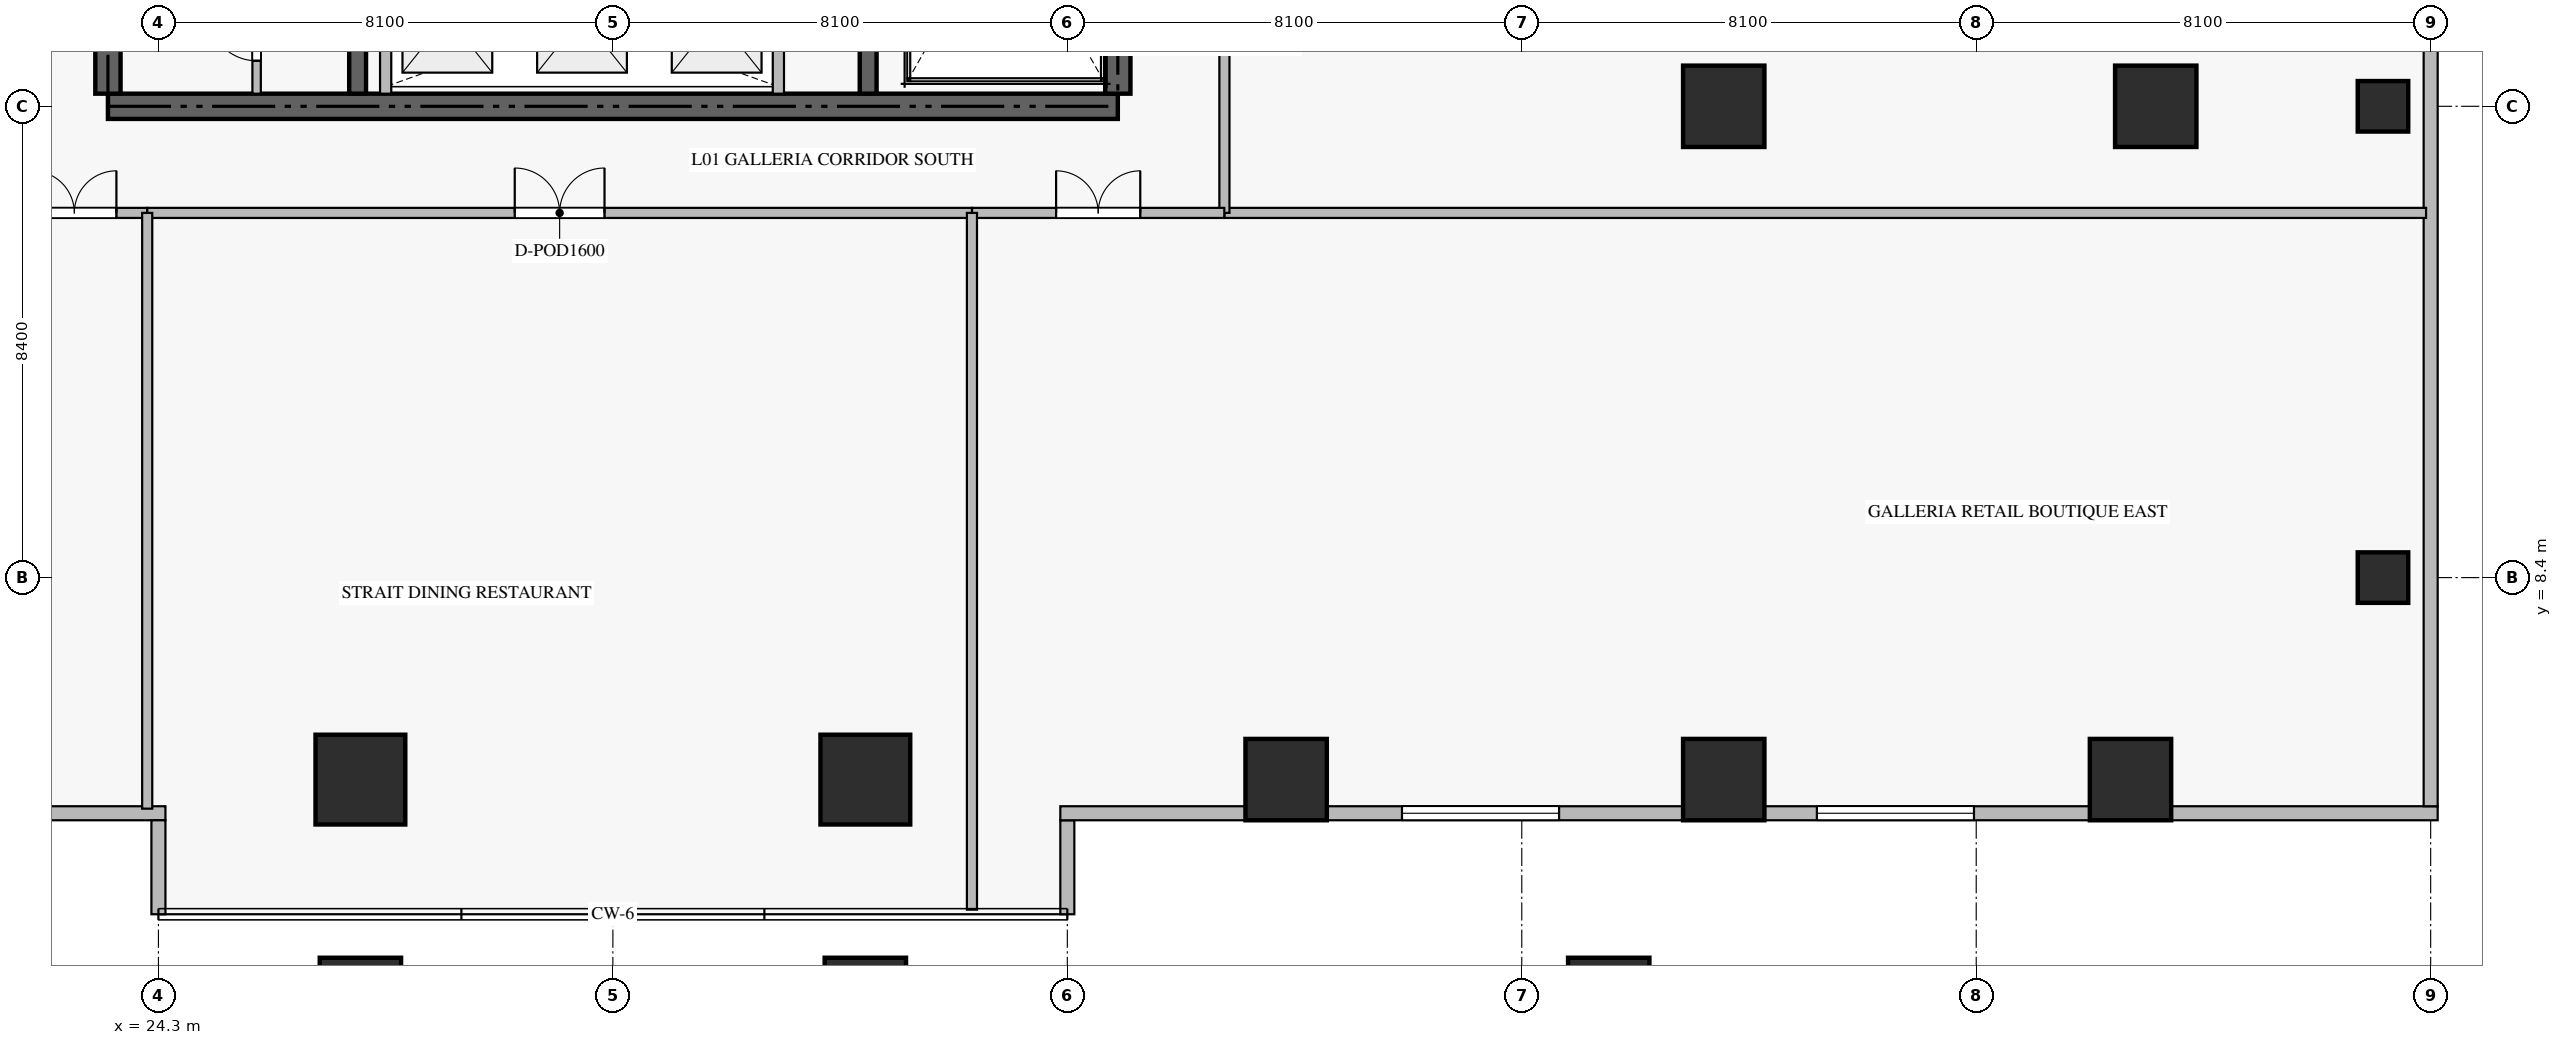
"""IFC4 building model, lengths in metres.
Left out: names, types, materials, properties, quantities, classifications, styles, units other than length and angle.
Written with IfcOpenShell. Run it as: python <this file> out.ifc"""

import sys

from ifc_helpers import new_model, si_unit, direction, frame, frame_2d, origin, origin_2d, place, context, subcontext, project, spatial, rectangle, extrude, source, transform, mapped, element, fill, save


model = new_model("IFC4")
c1 = context("Model", 3, precision=1e-05, world=origin(), true_north=direction((0.0, 1.0)))
c2 = subcontext(c1, "Body", "Model", "MODEL_VIEW")
j1 = project(units=[si_unit("LENGTHUNIT", "METRE"), si_unit("PLANEANGLEUNIT", "RADIAN")], contexts=[c1])
p1 = place(None, origin())
s1 = spatial("IfcSite", under=j1, at=p1, CompositionType="ELEMENT")
p2 = place(p1, origin())
s2 = spatial("IfcBuilding", under=s1, at=p2, CompositionType="ELEMENT")
p3 = place(p2, frame((0.0, 0.0, 5.5)))
s3 = spatial("IfcBuildingStorey", under=s2, at=p3, CompositionType="ELEMENT", Elevation=5.5)
p4 = place(p3, frame((23.4, 16.8, -0.38), z_axis=(0.0, 0.0, 1.0), x_axis=(1.0, 0.0, 0.0)))
e1 = element("IfcWall", 1, at=p4, inside=s3, PredefinedType="SHEAR", context=c2, shape_type="SweptSolid", body=[
    extrude(rectangle(XDim=18.0, YDim=0.45, at=frame_2d((9.0, 0.0))), origin(), (0.0, 0.0, 1.0), 4.998),
])
p5 = place(p3, frame((23.4, 17.025, -0.38), z_axis=(0.0, 0.0, 1.0), x_axis=(0.0, 1.0, 0.0)))
e2 = element("IfcWall", 2, at=p5, inside=s3, PredefinedType="SHEAR", context=c2, shape_type="SweptSolid", body=[
    extrude(rectangle(XDim=4.825, YDim=0.45, at=frame_2d((2.413, 0.0))), origin(), (0.0, 0.0, 1.0), 4.998),
])
p6 = place(p3, frame((41.4, 17.025, -0.38), z_axis=(0.0, 0.0, 1.0), x_axis=(0.0, 1.0, 0.0)))
e3 = element("IfcWall", 3, at=p6, inside=s3, PredefinedType="SHEAR", context=c2, shape_type="SweptSolid", body=[
    extrude(rectangle(XDim=8.325, YDim=0.45, at=frame_2d((4.163, 0.0))), origin(), (0.0, 0.0, 1.0), 4.998),
])
p7 = place(p3, frame((27.85, 17.025, -0.38), z_axis=(0.0, 0.0, 1.0), x_axis=(0.0, 1.0, 0.0)))
e4 = element("IfcWall", 4, at=p7, inside=s3, PredefinedType="SHEAR", context=c2, shape_type="SweptSolid", body=[
    extrude(rectangle(XDim=4.825, YDim=0.3, at=frame_2d((2.413, 0.0))), origin(), (0.0, 0.0, 1.0), 4.998),
])
p8 = place(p3, frame((36.95, 17.025, -0.38), z_axis=(0.0, 0.0, 1.0), x_axis=(0.0, 1.0, 0.0)))
e5 = element("IfcWall", 5, at=p8, inside=s3, PredefinedType="SHEAR", context=c2, shape_type="SweptSolid", body=[
    extrude(rectangle(XDim=8.325, YDim=0.3, at=frame_2d((4.163, 0.0))), origin(), (0.0, 0.0, 1.0), 4.998),
])
m1 = source(origin(), c2, "Body", "SweptSolid", [
    extrude(rectangle(XDim=0.9, YDim=0.9, at=origin_2d()), origin(), (0.0, 0.0, 1.0), 5.0),
])
for number, where, z_axis, x_axis in (
    (6, (63.95, 8.4, -0.38), (0.0, 0.0, 1.0), (1.0, 0.0, 0.0)),
    (7, (63.95, 16.8, -0.38), (0.0, 0.0, 1.0), (1.0, 0.0, 0.0)),
):
    element("IfcColumn", number, at=place(p3, frame(where, z_axis=z_axis, x_axis=x_axis)), inside=s3, PredefinedType="COLUMN", context=c2, shape_type="MappedRepresentation", body=[
        mapped(m1, transform((0.0, 0.0, 0.0), scale=1.0)),
    ])
m2 = source(origin(), c2, "Body", "SweptSolid", [
    extrude(rectangle(XDim=1.6, YDim=1.6, at=origin_2d()), origin(), (0.0, 0.0, 1.0), 5.0),
])
for number, where, z_axis, x_axis in (
    (8, (27.9, 4.8, -0.38), (0.0, 0.0, 1.0), (1.0, 0.0, 0.0)),
    (9, (36.9, 4.8, -0.38), (0.0, 0.0, 1.0), (1.0, 0.0, 0.0)),
):
    element("IfcColumn", number, at=place(p3, frame(where, z_axis=z_axis, x_axis=x_axis)), inside=s3, PredefinedType="COLUMN", context=c2, shape_type="MappedRepresentation", body=[
        mapped(m2, transform((0.0, 0.0, 0.0), scale=1.0)),
    ])
m3 = source(origin(), c2, "Body", "SweptSolid", [
    extrude(rectangle(XDim=1.45, YDim=1.45, at=origin_2d()), origin(), (0.0, 0.0, 1.0), 5.0),
])
for number, where, z_axis, x_axis in (
    (10, (44.4, 4.8, -0.38), (0.0, 0.0, 1.0), (1.0, 0.0, 0.0)),
    (11, (52.2, 4.8, -0.38), (0.0, 0.0, 1.0), (1.0, 0.0, 0.0)),
    (12, (52.2, 16.8, -0.38), (0.0, 0.0, 1.0), (1.0, 0.0, 0.0)),
    (13, (27.9, 0.9, -0.38), (0.0, 0.0, 1.0), (1.0, 0.0, 0.0)),
    (14, (36.9, 0.9, -0.38), (0.0, 0.0, 1.0), (1.0, 0.0, 0.0)),
    (15, (50.15, 0.9, -0.38), (0.0, 0.0, 1.0), (1.0, 0.0, 0.0)),
    (16, (59.9, 16.8, -0.38), (0.0, 0.0, 1.0), (1.0, 0.0, 0.0)),
    (17, (59.45, 4.8, -0.38), (0.0, 0.0, 1.0), (1.0, 0.0, 0.0)),
):
    element("IfcColumn", number, at=place(p3, frame(where, z_axis=z_axis, x_axis=x_axis)), inside=s3, PredefinedType="COLUMN", context=c2, shape_type="MappedRepresentation", body=[
        mapped(m3, transform((0.0, 0.0, 0.0), scale=1.0)),
    ])
p9 = place(p3, frame((-0.125, 4.2, 0.0), z_axis=(0.0, 0.0, 1.0), x_axis=(1.0, 0.0, 0.0)))
e18 = element("IfcWall", 18, at=p9, inside=s3, PredefinedType="ELEMENTEDWALL", context=c2, shape_type="SweptSolid", body=[
    extrude(rectangle(XDim=24.55, YDim=0.25, at=frame_2d((12.275, 0.0))), origin(), (0.0, 0.0, 1.0), 4.605),
])
p10 = place(p9, frame((8.265, 0.0, 0.6)))
e19 = element("IfcOpeningElement", 19, at=p10, cuts=e18, PredefinedType="OPENING", context=c2, shape_type="SweptSolid", body=[
    extrude(rectangle(XDim=2.8, YDim=3.0, at=frame_2d((1.4, 1.5))), frame((0.0, 0.135, 0.0), z_axis=(0.0, -1.0, 0.0), x_axis=(1.0, 0.0, 0.0)), (0.0, 0.0, 1.0), 0.27),
])
p11 = place(p9, frame((15.66, 0.0, 0.6)))
e20 = element("IfcOpeningElement", 20, at=p11, cuts=e18, PredefinedType="OPENING", context=c2, shape_type="SweptSolid", body=[
    extrude(rectangle(XDim=2.8, YDim=3.0, at=frame_2d((1.4, 1.5))), frame((0.0, 0.135, 0.0), z_axis=(0.0, -1.0, 0.0), x_axis=(1.0, 0.0, 0.0)), (0.0, 0.0, 1.0), 0.27),
])
for number, where, z_axis, x_axis in (
    (21, (24.3, 4.075, 0.0), (0.0, 0.0, 1.0), (0.0, -1.0, 0.0)),
    (22, (40.5, 2.4, 0.0), (0.0, 0.0, 1.0), (0.0, 1.0, 0.0)),
):
    element("IfcWall", number, at=place(p3, frame(where, z_axis=z_axis, x_axis=x_axis)), inside=s3, PredefinedType="ELEMENTEDWALL", context=c2, shape_type="SweptSolid", body=[
        extrude(rectangle(XDim=1.675, YDim=0.25, at=frame_2d((0.837, 0.0))), origin(), (0.0, 0.0, 1.0), 4.605),
    ])
p12 = place(p3, frame((40.375, 4.2, 0.0), z_axis=(0.0, 0.0, 1.0), x_axis=(1.0, 0.0, 0.0)))
e23 = element("IfcWall", 23, at=p12, inside=s3, PredefinedType="ELEMENTEDWALL", context=c2, shape_type="SweptSolid", body=[
    extrude(rectangle(XDim=24.55, YDim=0.25, at=frame_2d((12.275, 0.0))), origin(), (0.0, 0.0, 1.0), 4.605),
])
p13 = place(p12, frame((6.09, 0.0, 0.6)))
e24 = element("IfcOpeningElement", 24, at=p13, cuts=e23, PredefinedType="OPENING", context=c2, shape_type="SweptSolid", body=[
    extrude(rectangle(XDim=2.8, YDim=3.0, at=frame_2d((1.4, 1.5))), frame((0.0, 0.135, 0.0), z_axis=(0.0, -1.0, 0.0), x_axis=(1.0, 0.0, 0.0)), (0.0, 0.0, 1.0), 0.27),
])
p14 = place(p12, frame((13.485, 0.0, 0.6)))
e25 = element("IfcOpeningElement", 25, at=p14, cuts=e23, PredefinedType="OPENING", context=c2, shape_type="SweptSolid", body=[
    extrude(rectangle(XDim=2.8, YDim=3.0, at=frame_2d((1.4, 1.5))), frame((0.0, 0.135, 0.0), z_axis=(0.0, -1.0, 0.0), x_axis=(1.0, 0.0, 0.0)), (0.0, 0.0, 1.0), 0.27),
])
p15 = place(p3, frame((64.8, 4.325, 0.0), z_axis=(0.0, 0.0, 1.0), x_axis=(0.0, 1.0, 0.0)))
e26 = element("IfcWall", 26, at=p15, inside=s3, PredefinedType="ELEMENTEDWALL", context=c2, shape_type="SweptSolid", body=[
    extrude(rectangle(XDim=41.75, YDim=0.25, at=frame_2d((20.875, 0.0))), origin(), (0.0, 0.0, 1.0), 4.605),
])
p16 = place(p15, frame((14.801, 0.0, 0.6)))
e27 = element("IfcOpeningElement", 27, at=p16, cuts=e26, PredefinedType="OPENING", context=c2, shape_type="SweptSolid", body=[
    extrude(rectangle(XDim=2.8, YDim=3.0, at=frame_2d((1.4, 1.5))), frame((0.0, 0.135, 0.0), z_axis=(0.0, -1.0, 0.0), x_axis=(1.0, 0.0, 0.0)), (0.0, 0.0, 1.0), 0.27),
])
p17 = place(p15, frame((24.149, 0.0, 0.6)))
e28 = element("IfcOpeningElement", 28, at=p17, cuts=e26, PredefinedType="OPENING", context=c2, shape_type="SweptSolid", body=[
    extrude(rectangle(XDim=2.8, YDim=3.0, at=frame_2d((1.4, 1.5))), frame((0.0, 0.135, 0.0), z_axis=(0.0, -1.0, 0.0), x_axis=(1.0, 0.0, 0.0)), (0.0, 0.0, 1.0), 0.27),
])
for number, where, z_axis, x_axis in (
    (29, (28.35, 17.025, 0.0), (0.0, 0.0, 1.0), (0.0, 1.0, 0.0)),
    (30, (35.35, 17.025, 0.0), (0.0, 0.0, 1.0), (0.0, 1.0, 0.0)),
):
    element("IfcWall", number, at=place(p3, frame(where, z_axis=z_axis, x_axis=x_axis)), inside=s3, PredefinedType="STANDARD", context=c2, shape_type="SweptSolid", body=[
        extrude(rectangle(XDim=2.525, YDim=0.2, at=frame_2d((1.263, 0.0))), origin(), (0.0, 0.0, 1.0), 4.62),
    ])
p18 = place(p3, frame((26.05, 17.025, 0.0), z_axis=(0.0, 0.0, 1.0), x_axis=(0.0, 1.0, 0.0)))
e31 = element("IfcWall", 31, at=p18, inside=s3, PredefinedType="PARTITIONING", context=c2, shape_type="SweptSolid", body=[
    extrude(rectangle(XDim=2.023, YDim=0.15, at=frame_2d((1.012, 0.0))), origin(), (0.0, 0.0, 1.0), 4.62),
])
p19 = place(p18, frame((0.586, 0.0, 0.0)))
e32 = element("IfcOpeningElement", 32, at=p19, cuts=e31, PredefinedType="OPENING", context=c2, shape_type="SweptSolid", body=[
    extrude(rectangle(XDim=0.85, YDim=2.1, at=frame_2d((0.425, 1.05))), frame((0.0, 0.085, 0.0), z_axis=(0.0, -1.0, 0.0), x_axis=(1.0, 0.0, 0.0)), (0.0, 0.0, 1.0), 0.17),
])
p20 = place(p3, frame((43.3, 14.9, 0.0), z_axis=(0.0, 0.0, 1.0), x_axis=(1.0, 0.0, 0.0)))
e33 = element("IfcWall", 33, at=p20, inside=s3, PredefinedType="PARTITIONING", context=c2, shape_type="SweptSolid", body=[
    extrude(rectangle(XDim=21.418, YDim=0.18, at=frame_2d((10.709, 0.0))), origin(), (0.0, 0.0, 1.0), 4.62),
])
p21 = place(p3, frame((43.3, 14.9, 0.0), z_axis=(0.0, 0.0, 1.0), x_axis=(0.0, 1.0, 0.0)))
e34 = element("IfcWall", 34, at=p21, inside=s3, PredefinedType="PARTITIONING", context=c2, shape_type="SweptSolid", body=[
    extrude(rectangle(XDim=18.18, YDim=0.18, at=frame_2d((9.09, 0.0))), origin(), (0.0, 0.0, 1.0), 4.62),
])
p22 = place(p21, frame((8.34, 0.0, 0.0)))
e35 = element("IfcOpeningElement", 35, at=p22, cuts=e34, PredefinedType="OPENING", context=c2, shape_type="SweptSolid", body=[
    extrude(rectangle(XDim=1.5, YDim=2.25, at=frame_2d((0.75, 1.125))), frame((0.0, 0.1, 0.0), z_axis=(0.0, -1.0, 0.0), x_axis=(1.0, 0.0, 0.0)), (0.0, 0.0, 1.0), 0.2),
])
p23 = place(p3, frame((21.502, 14.9, 0.0), z_axis=(0.0, 0.0, 1.0), x_axis=(1.0, 0.0, 0.0)))
e36 = element("IfcWall", 36, at=p23, inside=s3, PredefinedType="PARTITIONING", context=c2, shape_type="SweptSolid", body=[
    extrude(rectangle(XDim=2.598, YDim=0.18, at=frame_2d((1.299, 0.0))), origin(), (0.0, 0.0, 1.0), 4.62),
])
p24 = place(p23, frame((0.549, 0.0, 0.0)))
e37 = element("IfcOpeningElement", 37, at=p24, cuts=e36, PredefinedType="OPENING", context=c2, shape_type="SweptSolid", body=[
    extrude(rectangle(XDim=1.5, YDim=2.25, at=frame_2d((0.75, 1.125))), frame((0.0, 0.1, 0.0), z_axis=(0.0, -1.0, 0.0), x_axis=(1.0, 0.0, 0.0)), (0.0, 0.0, 1.0), 0.2),
])
p25 = place(p3, frame((24.102, 14.9, 0.0), z_axis=(0.0, 0.0, 1.0), x_axis=(1.0, 0.0, 0.0)))
e38 = element("IfcWall", 38, at=p25, inside=s3, PredefinedType="PARTITIONING", context=c2, shape_type="SweptSolid", body=[
    extrude(rectangle(XDim=14.698, YDim=0.18, at=frame_2d((7.349, 0.0))), origin(), (0.0, 0.0, 1.0), 4.62),
])
p26 = place(p25, frame((6.549, 0.0, 0.0)))
e39 = element("IfcOpeningElement", 39, at=p26, cuts=e38, PredefinedType="OPENING", context=c2, shape_type="SweptSolid", body=[
    extrude(rectangle(XDim=1.6, YDim=2.3, at=frame_2d((0.8, 1.15))), frame((0.0, 0.1, 0.0), z_axis=(0.0, -1.0, 0.0), x_axis=(1.0, 0.0, 0.0)), (0.0, 0.0, 1.0), 0.2),
])
p27 = place(p3, frame((38.802, 14.9, 0.0), z_axis=(0.0, 0.0, 1.0), x_axis=(1.0, 0.0, 0.0)))
e40 = element("IfcWall", 40, at=p27, inside=s3, PredefinedType="PARTITIONING", context=c2, shape_type="SweptSolid", body=[
    extrude(rectangle(XDim=4.496, YDim=0.18, at=frame_2d((2.248, 0.0))), origin(), (0.0, 0.0, 1.0), 4.62),
])
p28 = place(p27, frame((1.498, 0.0, 0.0)))
e41 = element("IfcOpeningElement", 41, at=p28, cuts=e40, PredefinedType="OPENING", context=c2, shape_type="SweptSolid", body=[
    extrude(rectangle(XDim=1.5, YDim=2.25, at=frame_2d((0.75, 1.125))), frame((0.0, 0.1, 0.0), z_axis=(0.0, -1.0, 0.0), x_axis=(1.0, 0.0, 0.0)), (0.0, 0.0, 1.0), 0.2),
])
p29 = place(p3, frame((24.1, 4.282, 0.0), z_axis=(0.0, 0.0, 1.0), x_axis=(0.0, 1.0, 0.0)))
e42 = element("IfcWall", 42, at=p29, inside=s3, PredefinedType="PARTITIONING", context=c2, shape_type="SweptSolid", body=[
    extrude(rectangle(XDim=10.618, YDim=0.18, at=frame_2d((5.309, 0.0))), origin(), (0.0, 0.0, 1.0), 4.62),
])
p30 = place(p3, frame((38.8, 2.482, 0.0), z_axis=(0.0, 0.0, 1.0), x_axis=(0.0, 1.0, 0.0)))
e43 = element("IfcWall", 43, at=p30, inside=s3, PredefinedType="PARTITIONING", context=c2, shape_type="SweptSolid", body=[
    extrude(rectangle(XDim=12.418, YDim=0.18, at=frame_2d((6.209, 0.0))), origin(), (0.0, 0.0, 1.0), 4.62),
])
m4 = source(origin(), c2, "Body", "SweptSolid", [
    extrude(rectangle(XDim=2.8, YDim=3.0, at=frame_2d((1.4, 1.5))), frame((0.0, 0.03, 0.0), z_axis=(0.0, -1.0, 0.0), x_axis=(1.0, 0.0, 0.0)), (0.0, 0.0, 1.0), 0.06),
])
p31 = place(p13, origin())
e44 = element("IfcWindow", 44, at=p31, inside=s3, PartitioningType="SINGLE_PANEL", PredefinedType="WINDOW", context=c2, shape_type="MappedRepresentation", body=[
    mapped(m4, transform((0.0, 0.0, 0.0), scale=1.0)),
])
fill(e24, e44)
p32 = place(p14, origin())
e45 = element("IfcWindow", 45, at=p32, inside=s3, PartitioningType="SINGLE_PANEL", PredefinedType="WINDOW", context=c2, shape_type="MappedRepresentation", body=[
    mapped(m4, transform((0.0, 0.0, 0.0), scale=1.0)),
])
fill(e25, e45)
m5 = source(origin(), c2, "Body", "SweptSolid", [
    extrude(rectangle(XDim=0.85, YDim=2.1, at=frame_2d((0.425, 1.05))), frame((0.0, 0.025, 0.0), z_axis=(0.0, -1.0, 0.0), x_axis=(1.0, 0.0, 0.0)), (0.0, 0.0, 1.0), 0.05),
])
p33 = place(p19, origin())
e46 = element("IfcDoor", 46, at=p33, inside=s3, OperationType="SINGLE_SWING_RIGHT", PredefinedType="DOOR", context=c2, shape_type="MappedRepresentation", body=[
    mapped(m5, transform((0.0, 0.0, 0.0), scale=1.0)),
])
fill(e32, e46)
m6 = source(origin(), c2, "Body", "SweptSolid", [
    extrude(rectangle(XDim=1.5, YDim=2.25, at=frame_2d((0.75, 1.125))), frame((0.0, 0.025, 0.0), z_axis=(0.0, -1.0, 0.0), x_axis=(1.0, 0.0, 0.0)), (0.0, 0.0, 1.0), 0.05),
])
p34 = place(p24, origin())
e47 = element("IfcDoor", 47, at=p34, inside=s3, OperationType="DOUBLE_DOOR_SINGLE_SWING", PredefinedType="DOOR", context=c2, shape_type="MappedRepresentation", body=[
    mapped(m6, transform((0.0, 0.0, 0.0), scale=1.0)),
])
fill(e37, e47)
m7 = source(origin(), c2, "Body", "SweptSolid", [
    extrude(rectangle(XDim=1.6, YDim=2.3, at=frame_2d((0.8, 1.15))), frame((0.0, 0.025, 0.0), z_axis=(0.0, -1.0, 0.0), x_axis=(1.0, 0.0, 0.0)), (0.0, 0.0, 1.0), 0.05),
])
p35 = place(p26, origin())
e48 = element("IfcDoor", 48, at=p35, inside=s3, OperationType="DOUBLE_DOOR_SINGLE_SWING", PredefinedType="DOOR", context=c2, shape_type="MappedRepresentation", body=[
    mapped(m7, transform((0.0, 0.0, 0.0), scale=1.0)),
])
fill(e39, e48)
p36 = place(p28, origin())
e49 = element("IfcDoor", 49, at=p36, inside=s3, OperationType="DOUBLE_DOOR_SINGLE_SWING", PredefinedType="DOOR", context=c2, shape_type="MappedRepresentation", body=[
    mapped(m6, transform((0.0, 0.0, 0.0), scale=1.0)),
])
fill(e41, e49)
save(model, sys.argv[1])
